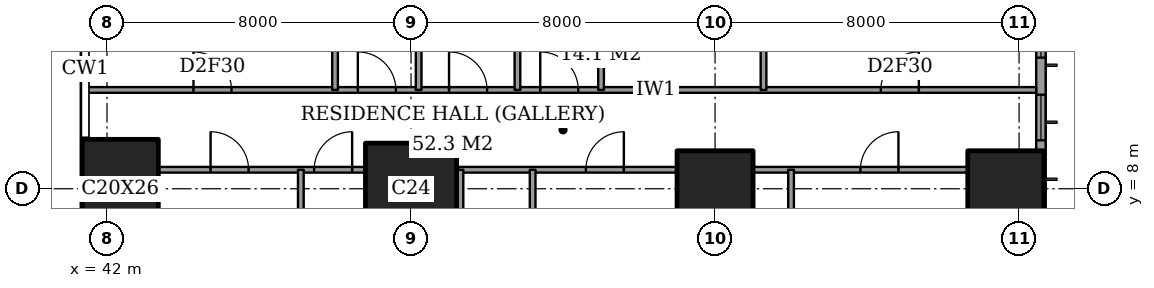
"""IFC4 building model, lengths in metres.
Left out: names, types, materials, properties, quantities, classifications, styles, units other than length and angle.
Written with IfcOpenShell. Run it as: python <this file> out.ifc"""

import sys

from ifc_helpers import new_model, si_unit, direction, frame, frame_2d, origin, origin_2d, place, context, subcontext, project, spatial, rectangle, extrude, element, fill, save


model = new_model("IFC4")
c1 = context("Model", 3, precision=1e-05, world=origin(), true_north=direction((0.0, 1.0)))
c2 = subcontext(c1, "Body", "Model", "MODEL_VIEW")
j1 = project(units=[si_unit("LENGTHUNIT", "METRE"), si_unit("PLANEANGLEUNIT", "RADIAN")], contexts=[c1])
p1 = place(None, origin())
s1 = spatial("IfcSite", under=j1, at=p1, CompositionType="ELEMENT")
p2 = place(p1, origin())
s2 = spatial("IfcBuilding", under=s1, at=p2, CompositionType="ELEMENT")
p3 = place(p2, frame((0.0, 0.0, 58.4)))
s3 = spatial("IfcBuildingStorey", under=s2, at=p3, CompositionType="ELEMENT", Elevation=58.4)
p4 = place(p3, frame((42.35, 8.0, 0.0), z_axis=(0.0, 0.0, 1.0), x_axis=(1.0, 0.0, 0.0)))
e1 = element("IfcColumn", 1, at=p4, inside=s3, PredefinedType="COLUMN", context=c2, shape_type="SweptSolid", body=[
    extrude(rectangle(XDim=2.0, YDim=2.6, at=origin_2d()), origin(), (0.0, 0.0, 1.0), 3.6),
])
p5 = place(p3, frame((50.0, 8.0, 0.0), z_axis=(0.0, 0.0, 1.0), x_axis=(1.0, 0.0, 0.0)))
e2 = element("IfcColumn", 2, at=p5, inside=s3, PredefinedType="COLUMN", context=c2, shape_type="SweptSolid", body=[
    extrude(rectangle(XDim=2.4, YDim=2.4, at=origin_2d()), origin(), (0.0, 0.0, 1.0), 3.6),
])
for number, where, z_axis, x_axis in (
    (3, (58.0, 8.0, 0.0), (0.0, 0.0, 1.0), (1.0, 0.0, 0.0)),
    (4, (65.65, 8.0, 0.0), (0.0, 0.0, 1.0), (1.0, 0.0, 0.0)),
):
    element("IfcColumn", number, at=place(p3, frame(where, z_axis=z_axis, x_axis=x_axis)), inside=s3, PredefinedType="COLUMN", context=c2, shape_type="SweptSolid", body=[
        extrude(rectangle(XDim=2.0, YDim=2.0, at=origin_2d()), origin(), (0.0, 0.0, 1.0), 3.6),
    ])
p6 = place(p3, frame((66.575, 3.175, 0.0), z_axis=(0.0, 0.0, 1.0), x_axis=(0.0, 1.0, 0.0)))
e5 = element("IfcWall", 5, at=p6, inside=s3, PredefinedType="SOLIDWALL", context=c2, shape_type="SweptSolid", body=[
    extrude(rectangle(XDim=41.65, YDim=0.25, at=frame_2d((20.825, 0.0))), origin(), (0.0, 0.0, 1.0), 3.6),
])
p7 = place(p6, frame((0.775, 0.0, 0.6)))
e6 = element("IfcOpeningElement", 6, at=p7, cuts=e5, PredefinedType="OPENING", context=c2, shape_type="SweptSolid", body=[
    extrude(rectangle(XDim=2.4, YDim=2.0, at=frame_2d((1.2, 1.0))), frame((0.0, 0.135, 0.0), z_axis=(0.0, -1.0, 0.0), x_axis=(1.0, 0.0, 0.0)), (0.0, 0.0, 1.0), 0.27),
])
p8 = place(p6, frame((6.1, 0.0, 0.6)))
e7 = element("IfcOpeningElement", 7, at=p8, cuts=e5, PredefinedType="OPENING", context=c2, shape_type="SweptSolid", body=[
    extrude(rectangle(XDim=1.2, YDim=2.0, at=frame_2d((0.6, 1.0))), frame((0.0, 0.135, 0.0), z_axis=(0.0, -1.0, 0.0), x_axis=(1.0, 0.0, 0.0)), (0.0, 0.0, 1.0), 0.27),
])
p9 = place(p6, frame((8.275, 0.0, 0.6)))
e8 = element("IfcOpeningElement", 8, at=p9, cuts=e5, PredefinedType="OPENING", context=c2, shape_type="SweptSolid", body=[
    extrude(rectangle(XDim=2.4, YDim=2.0, at=frame_2d((1.2, 1.0))), frame((0.0, 0.135, 0.0), z_axis=(0.0, -1.0, 0.0), x_axis=(1.0, 0.0, 0.0)), (0.0, 0.0, 1.0), 0.27),
])
p10 = place(p6, frame((15.775, 0.0, 0.6)))
e9 = element("IfcOpeningElement", 9, at=p10, cuts=e5, PredefinedType="OPENING", context=c2, shape_type="SweptSolid", body=[
    extrude(rectangle(XDim=2.4, YDim=2.0, at=frame_2d((1.2, 1.0))), frame((0.0, 0.135, 0.0), z_axis=(0.0, -1.0, 0.0), x_axis=(1.0, 0.0, 0.0)), (0.0, 0.0, 1.0), 0.27),
])
p11 = place(p6, frame((23.475, 0.0, 0.6)))
e10 = element("IfcOpeningElement", 10, at=p11, cuts=e5, PredefinedType="OPENING", context=c2, shape_type="SweptSolid", body=[
    extrude(rectangle(XDim=2.4, YDim=2.0, at=frame_2d((1.2, 1.0))), frame((0.0, 0.135, 0.0), z_axis=(0.0, -1.0, 0.0), x_axis=(1.0, 0.0, 0.0)), (0.0, 0.0, 1.0), 0.27),
])
p12 = place(p6, frame((30.875, 0.0, 0.6)))
e11 = element("IfcOpeningElement", 11, at=p12, cuts=e5, PredefinedType="OPENING", context=c2, shape_type="SweptSolid", body=[
    extrude(rectangle(XDim=2.4, YDim=2.0, at=frame_2d((1.2, 1.0))), frame((0.0, 0.135, 0.0), z_axis=(0.0, -1.0, 0.0), x_axis=(1.0, 0.0, 0.0)), (0.0, 0.0, 1.0), 0.27),
])
p13 = place(p6, frame((34.325, 0.0, 0.6)))
e12 = element("IfcOpeningElement", 12, at=p13, cuts=e5, PredefinedType="OPENING", context=c2, shape_type="SweptSolid", body=[
    extrude(rectangle(XDim=1.2, YDim=2.0, at=frame_2d((0.6, 1.0))), frame((0.0, 0.135, 0.0), z_axis=(0.0, -1.0, 0.0), x_axis=(1.0, 0.0, 0.0)), (0.0, 0.0, 1.0), 0.27),
])
p14 = place(p6, frame((38.475, 0.0, 0.6)))
e13 = element("IfcOpeningElement", 13, at=p14, cuts=e5, PredefinedType="OPENING", context=c2, shape_type="SweptSolid", body=[
    extrude(rectangle(XDim=2.4, YDim=2.0, at=frame_2d((1.2, 1.0))), frame((0.0, 0.135, 0.0), z_axis=(0.0, -1.0, 0.0), x_axis=(1.0, 0.0, 0.0)), (0.0, 0.0, 1.0), 0.27),
])
p15 = place(p3, frame((43.35, 8.5, 0.0), z_axis=(0.0, 0.0, 1.0), x_axis=(1.0, 0.0, 0.0)))
e14 = element("IfcWall", 14, at=p15, inside=s3, PredefinedType="PARTITIONING", context=c2, shape_type="SweptSolid", body=[
    extrude(rectangle(XDim=5.45, YDim=0.15, at=frame_2d((2.725, 0.0))), origin(), (0.0, 0.0, 1.0), 3.35),
])
p16 = place(p15, frame((4.1, 0.0, 0.0)))
e15 = element("IfcOpeningElement", 15, at=p16, cuts=e14, PredefinedType="OPENING", context=c2, shape_type="SweptSolid", body=[
    extrude(rectangle(XDim=1.0, YDim=2.1, at=frame_2d((0.5, 1.05))), frame((0.0, 0.085, 0.0), z_axis=(0.0, -1.0, 0.0), x_axis=(1.0, 0.0, 0.0)), (0.0, 0.0, 1.0), 0.17),
])
p17 = place(p15, frame((1.375, 0.0, 0.0)))
e16 = element("IfcOpeningElement", 16, at=p17, cuts=e14, PredefinedType="OPENING", context=c2, shape_type="SweptSolid", body=[
    extrude(rectangle(XDim=1.0, YDim=2.1, at=frame_2d((0.5, 1.05))), frame((0.0, 0.085, 0.0), z_axis=(0.0, -1.0, 0.0), x_axis=(1.0, 0.0, 0.0)), (0.0, 0.0, 1.0), 0.17),
])
p18 = place(p3, frame((51.2, 8.5, 0.0), z_axis=(0.0, 0.0, 1.0), x_axis=(1.0, 0.0, 0.0)))
e17 = element("IfcWall", 17, at=p18, inside=s3, PredefinedType="PARTITIONING", context=c2, shape_type="SweptSolid", body=[
    extrude(rectangle(XDim=5.8, YDim=0.15, at=frame_2d((2.9, 0.0))), origin(), (0.0, 0.0, 1.0), 3.35),
])
p19 = place(p18, frame((3.4, 0.0, 0.0)))
e18 = element("IfcOpeningElement", 18, at=p19, cuts=e17, PredefinedType="OPENING", context=c2, shape_type="SweptSolid", body=[
    extrude(rectangle(XDim=1.0, YDim=2.1, at=frame_2d((0.5, 1.05))), frame((0.0, 0.085, 0.0), z_axis=(0.0, -1.0, 0.0), x_axis=(1.0, 0.0, 0.0)), (0.0, 0.0, 1.0), 0.17),
])
p20 = place(p3, frame((59.0, 8.5, 0.0), z_axis=(0.0, 0.0, 1.0), x_axis=(1.0, 0.0, 0.0)))
e19 = element("IfcWall", 19, at=p20, inside=s3, PredefinedType="PARTITIONING", context=c2, shape_type="SweptSolid", body=[
    extrude(rectangle(XDim=5.65, YDim=0.15, at=frame_2d((2.825, 0.0))), origin(), (0.0, 0.0, 1.0), 3.35),
])
p21 = place(p20, frame((2.825, 0.0, 0.0)))
e20 = element("IfcOpeningElement", 20, at=p21, cuts=e19, PredefinedType="OPENING", context=c2, shape_type="SweptSolid", body=[
    extrude(rectangle(XDim=1.0, YDim=2.1, at=frame_2d((0.5, 1.05))), frame((0.0, 0.085, 0.0), z_axis=(0.0, -1.0, 0.0), x_axis=(1.0, 0.0, 0.0)), (0.0, 0.0, 1.0), 0.17),
])
p22 = place(p3, frame((41.439, 10.6, 0.0), z_axis=(0.0, 0.0, 1.0), x_axis=(1.0, 0.0, 0.0)))
e21 = element("IfcWall", 21, at=p22, inside=s3, PredefinedType="PARTITIONING", context=c2, shape_type="SweptSolid", body=[
    extrude(rectangle(XDim=25.011, YDim=0.15, at=frame_2d((12.505, 0.0))), origin(), (0.0, 0.0, 1.0), 3.35),
])
p23 = place(p22, frame((11.961, 0.0, 0.0)))
e22 = element("IfcOpeningElement", 22, at=p23, cuts=e21, PredefinedType="OPENING", context=c2, shape_type="SweptSolid", body=[
    extrude(rectangle(XDim=1.0, YDim=2.1, at=frame_2d((0.5, 1.05))), frame((0.0, 0.085, 0.0), z_axis=(0.0, -1.0, 0.0), x_axis=(1.0, 0.0, 0.0)), (0.0, 0.0, 1.0), 0.17),
])
p24 = place(p22, frame((20.924, 0.0, 0.0)))
e23 = element("IfcOpeningElement", 23, at=p24, cuts=e21, PredefinedType="OPENING", context=c2, shape_type="SweptSolid", body=[
    extrude(rectangle(XDim=1.0, YDim=2.1, at=frame_2d((0.5, 1.05))), frame((0.0, 0.085, 0.0), z_axis=(0.0, -1.0, 0.0), x_axis=(1.0, 0.0, 0.0)), (0.0, 0.0, 1.0), 0.17),
])
p25 = place(p22, frame((9.561, 0.0, 0.0)))
e24 = element("IfcOpeningElement", 24, at=p25, cuts=e21, PredefinedType="OPENING", context=c2, shape_type="SweptSolid", body=[
    extrude(rectangle(XDim=1.0, YDim=2.1, at=frame_2d((0.5, 1.05))), frame((0.0, 0.085, 0.0), z_axis=(0.0, -1.0, 0.0), x_axis=(1.0, 0.0, 0.0)), (0.0, 0.0, 1.0), 0.17),
])
p26 = place(p22, frame((7.161, 0.0, 0.0)))
e25 = element("IfcOpeningElement", 25, at=p26, cuts=e21, PredefinedType="OPENING", context=c2, shape_type="SweptSolid", body=[
    extrude(rectangle(XDim=1.0, YDim=2.1, at=frame_2d((0.5, 1.05))), frame((0.0, 0.085, 0.0), z_axis=(0.0, -1.0, 0.0), x_axis=(1.0, 0.0, 0.0)), (0.0, 0.0, 1.0), 0.17),
])
p27 = place(p22, frame((2.836, 0.0, 0.0)))
e26 = element("IfcOpeningElement", 26, at=p27, cuts=e21, PredefinedType="OPENING", context=c2, shape_type="SweptSolid", body=[
    extrude(rectangle(XDim=1.0, YDim=2.1, at=frame_2d((0.5, 1.05))), frame((0.0, 0.085, 0.0), z_axis=(0.0, -1.0, 0.0), x_axis=(1.0, 0.0, 0.0)), (0.0, 0.0, 1.0), 0.17),
])
p28 = place(p3, frame((47.1, -0.45, 0.0), z_axis=(0.0, 0.0, 1.0), x_axis=(0.0, 1.0, 0.0)))
e27 = element("IfcWall", 27, at=p28, inside=s3, PredefinedType="PARTITIONING", context=c2, shape_type="SweptSolid", body=[
    extrude(rectangle(XDim=8.95, YDim=0.15, at=frame_2d((4.475, 0.0))), origin(), (0.0, 0.0, 1.0), 3.35),
])
p29 = place(p3, frame((48.0, 10.6, 0.0), z_axis=(0.0, 0.0, 1.0), x_axis=(0.0, 1.0, 0.0)))
e28 = element("IfcWall", 28, at=p29, inside=s3, PredefinedType="PARTITIONING", context=c2, shape_type="SweptSolid", body=[
    extrude(rectangle(XDim=6.4, YDim=0.15, at=frame_2d((3.2, 0.0))), origin(), (0.0, 0.0, 1.0), 3.35),
])
p30 = place(p3, frame((50.2, 10.6, 0.0), z_axis=(0.0, 0.0, 1.0), x_axis=(0.0, 1.0, 0.0)))
e29 = element("IfcWall", 29, at=p30, inside=s3, PredefinedType="PARTITIONING", context=c2, shape_type="SweptSolid", body=[
    extrude(rectangle(XDim=4.2, YDim=0.15, at=frame_2d((2.1, 0.0))), origin(), (0.0, 0.0, 1.0), 3.35),
])
p31 = place(p3, frame((51.3, -0.45, 0.0), z_axis=(0.0, 0.0, 1.0), x_axis=(0.0, 1.0, 0.0)))
e30 = element("IfcWall", 30, at=p31, inside=s3, PredefinedType="PARTITIONING", context=c2, shape_type="SweptSolid", body=[
    extrude(rectangle(XDim=8.95, YDim=0.15, at=frame_2d((4.475, 0.0))), origin(), (0.0, 0.0, 1.0), 3.35),
])
p32 = place(p31, frame((4.025, 0.0, 0.0)))
e31 = element("IfcOpeningElement", 31, at=p32, cuts=e30, PredefinedType="OPENING", context=c2, shape_type="SweptSolid", body=[
    extrude(rectangle(XDim=0.9, YDim=2.1, at=frame_2d((0.45, 1.05))), frame((0.0, 0.085, 0.0), z_axis=(0.0, -1.0, 0.0), x_axis=(1.0, 0.0, 0.0)), (0.0, 0.0, 1.0), 0.17),
])
p33 = place(p3, frame((52.8, 10.6, 0.0), z_axis=(0.0, 0.0, 1.0), x_axis=(0.0, 1.0, 0.0)))
e32 = element("IfcWall", 32, at=p33, inside=s3, PredefinedType="PARTITIONING", context=c2, shape_type="SweptSolid", body=[
    extrude(rectangle(XDim=6.4, YDim=0.15, at=frame_2d((3.2, 0.0))), origin(), (0.0, 0.0, 1.0), 3.35),
])
p34 = place(p3, frame((53.2, -0.45, 0.0), z_axis=(0.0, 0.0, 1.0), x_axis=(0.0, 1.0, 0.0)))
e33 = element("IfcWall", 33, at=p34, inside=s3, PredefinedType="PARTITIONING", context=c2, shape_type="SweptSolid", body=[
    extrude(rectangle(XDim=8.95, YDim=0.15, at=frame_2d((4.475, 0.0))), origin(), (0.0, 0.0, 1.0), 3.35),
])
p35 = place(p3, frame((55.0, 10.6, 0.0), z_axis=(0.0, 0.0, 1.0), x_axis=(0.0, 1.0, 0.0)))
e34 = element("IfcWall", 34, at=p35, inside=s3, PredefinedType="PARTITIONING", context=c2, shape_type="SweptSolid", body=[
    extrude(rectangle(XDim=11.0, YDim=0.15, at=frame_2d((5.5, 0.0))), origin(), (0.0, 0.0, 1.0), 3.35),
])
p36 = place(p35, frame((8.2, 0.0, 0.0)))
e35 = element("IfcOpeningElement", 35, at=p36, cuts=e34, PredefinedType="OPENING", context=c2, shape_type="SweptSolid", body=[
    extrude(rectangle(XDim=1.0, YDim=2.1, at=frame_2d((0.5, 1.05))), frame((0.0, 0.085, 0.0), z_axis=(0.0, -1.0, 0.0), x_axis=(1.0, 0.0, 0.0)), (0.0, 0.0, 1.0), 0.17),
])
p37 = place(p3, frame((59.275, 10.6, 0.0), z_axis=(0.0, 0.0, 1.0), x_axis=(0.0, 1.0, 0.0)))
e36 = element("IfcWall", 36, at=p37, inside=s3, PredefinedType="PARTITIONING", context=c2, shape_type="SweptSolid", body=[
    extrude(rectangle(XDim=4.2, YDim=0.15, at=frame_2d((2.1, 0.0))), origin(), (0.0, 0.0, 1.0), 3.35),
])
p38 = place(p37, frame((1.25, 0.0, 0.0)))
e37 = element("IfcOpeningElement", 37, at=p38, cuts=e36, PredefinedType="OPENING", context=c2, shape_type="SweptSolid", body=[
    extrude(rectangle(XDim=0.9, YDim=2.1, at=frame_2d((0.45, 1.05))), frame((0.0, 0.085, 0.0), z_axis=(0.0, -1.0, 0.0), x_axis=(1.0, 0.0, 0.0)), (0.0, 0.0, 1.0), 0.17),
])
p39 = place(p3, frame((60.0, -0.45, 0.0), z_axis=(0.0, 0.0, 1.0), x_axis=(0.0, 1.0, 0.0)))
e38 = element("IfcWall", 38, at=p39, inside=s3, PredefinedType="PARTITIONING", context=c2, shape_type="SweptSolid", body=[
    extrude(rectangle(XDim=8.95, YDim=0.15, at=frame_2d((4.475, 0.0))), origin(), (0.0, 0.0, 1.0), 3.35),
])
p40 = place(p8, origin())
e39 = element("IfcWindow", 39, at=p40, inside=s3, PartitioningType="SINGLE_PANEL", PredefinedType="WINDOW", context=c2, shape_type="SweptSolid", body=[
    extrude(rectangle(XDim=1.2, YDim=2.0, at=frame_2d((0.6, 1.0))), frame((0.0, 0.03, 0.0), z_axis=(0.0, -1.0, 0.0), x_axis=(1.0, 0.0, 0.0)), (0.0, 0.0, 1.0), 0.06),
])
fill(e7, e39)
p41 = place(p9, origin())
e40 = element("IfcWindow", 40, at=p41, inside=s3, PartitioningType="SINGLE_PANEL", PredefinedType="WINDOW", context=c2, shape_type="SweptSolid", body=[
    extrude(rectangle(XDim=2.4, YDim=2.0, at=frame_2d((1.2, 1.0))), frame((0.0, 0.03, 0.0), z_axis=(0.0, -1.0, 0.0), x_axis=(1.0, 0.0, 0.0)), (0.0, 0.0, 1.0), 0.06),
])
fill(e8, e40)
p42 = place(p21, origin())
e41 = element("IfcDoor", 41, at=p42, inside=s3, OperationType="SINGLE_SWING_LEFT", PredefinedType="DOOR", context=c2, shape_type="SweptSolid", body=[
    extrude(rectangle(XDim=1.0, YDim=2.1, at=frame_2d((0.5, 1.05))), frame((0.0, 0.025, 0.0), z_axis=(0.0, -1.0, 0.0), x_axis=(1.0, 0.0, 0.0)), (0.0, 0.0, 1.0), 0.05),
])
fill(e20, e41)
p43 = place(p19, origin())
e42 = element("IfcDoor", 42, at=p43, inside=s3, OperationType="SINGLE_SWING_LEFT", PredefinedType="DOOR", context=c2, shape_type="SweptSolid", body=[
    extrude(rectangle(XDim=1.0, YDim=2.1, at=frame_2d((0.5, 1.05))), frame((0.0, 0.025, 0.0), z_axis=(0.0, -1.0, 0.0), x_axis=(1.0, 0.0, 0.0)), (0.0, 0.0, 1.0), 0.05),
])
fill(e18, e42)
p44 = place(p16, origin())
e43 = element("IfcDoor", 43, at=p44, inside=s3, OperationType="SINGLE_SWING_LEFT", PredefinedType="DOOR", context=c2, shape_type="SweptSolid", body=[
    extrude(rectangle(XDim=1.0, YDim=2.1, at=frame_2d((0.5, 1.05))), frame((0.0, 0.025, 0.0), z_axis=(0.0, -1.0, 0.0), x_axis=(1.0, 0.0, 0.0)), (0.0, 0.0, 1.0), 0.05),
])
fill(e15, e43)
p45 = place(p17, origin())
e44 = element("IfcDoor", 44, at=p45, inside=s3, OperationType="SINGLE_SWING_RIGHT", PredefinedType="DOOR", context=c2, shape_type="SweptSolid", body=[
    extrude(rectangle(XDim=1.0, YDim=2.1, at=frame_2d((0.5, 1.05))), frame((0.0, 0.025, 0.0), z_axis=(0.0, -1.0, 0.0), x_axis=(1.0, 0.0, 0.0)), (0.0, 0.0, 1.0), 0.05),
])
fill(e16, e44)
p46 = place(p23, origin())
e45 = element("IfcDoor", 45, at=p46, inside=s3, OperationType="SINGLE_SWING_RIGHT", PredefinedType="DOOR", context=c2, shape_type="SweptSolid", body=[
    extrude(rectangle(XDim=1.0, YDim=2.1, at=frame_2d((0.5, 1.05))), frame((0.0, 0.025, 0.0), z_axis=(0.0, -1.0, 0.0), x_axis=(1.0, 0.0, 0.0)), (0.0, 0.0, 1.0), 0.05),
])
fill(e22, e45)
p47 = place(p24, origin())
e46 = element("IfcDoor", 46, at=p47, inside=s3, OperationType="SINGLE_SWING_LEFT", PredefinedType="DOOR", context=c2, shape_type="SweptSolid", body=[
    extrude(rectangle(XDim=1.0, YDim=2.1, at=frame_2d((0.5, 1.05))), frame((0.0, 0.025, 0.0), z_axis=(0.0, -1.0, 0.0), x_axis=(1.0, 0.0, 0.0)), (0.0, 0.0, 1.0), 0.05),
])
fill(e23, e46)
p48 = place(p25, origin())
e47 = element("IfcDoor", 47, at=p48, inside=s3, OperationType="SINGLE_SWING_RIGHT", PredefinedType="DOOR", context=c2, shape_type="SweptSolid", body=[
    extrude(rectangle(XDim=1.0, YDim=2.1, at=frame_2d((0.5, 1.05))), frame((0.0, 0.025, 0.0), z_axis=(0.0, -1.0, 0.0), x_axis=(1.0, 0.0, 0.0)), (0.0, 0.0, 1.0), 0.05),
])
fill(e24, e47)
p49 = place(p26, origin())
e48 = element("IfcDoor", 48, at=p49, inside=s3, OperationType="SINGLE_SWING_RIGHT", PredefinedType="DOOR", context=c2, shape_type="SweptSolid", body=[
    extrude(rectangle(XDim=1.0, YDim=2.1, at=frame_2d((0.5, 1.05))), frame((0.0, 0.025, 0.0), z_axis=(0.0, -1.0, 0.0), x_axis=(1.0, 0.0, 0.0)), (0.0, 0.0, 1.0), 0.05),
])
fill(e25, e48)
p50 = place(p27, origin())
e49 = element("IfcDoor", 49, at=p50, inside=s3, OperationType="SINGLE_SWING_RIGHT", PredefinedType="DOOR", context=c2, shape_type="SweptSolid", body=[
    extrude(rectangle(XDim=1.0, YDim=2.1, at=frame_2d((0.5, 1.05))), frame((0.0, 0.025, 0.0), z_axis=(0.0, -1.0, 0.0), x_axis=(1.0, 0.0, 0.0)), (0.0, 0.0, 1.0), 0.05),
])
fill(e26, e49)
save(model, sys.argv[1])
